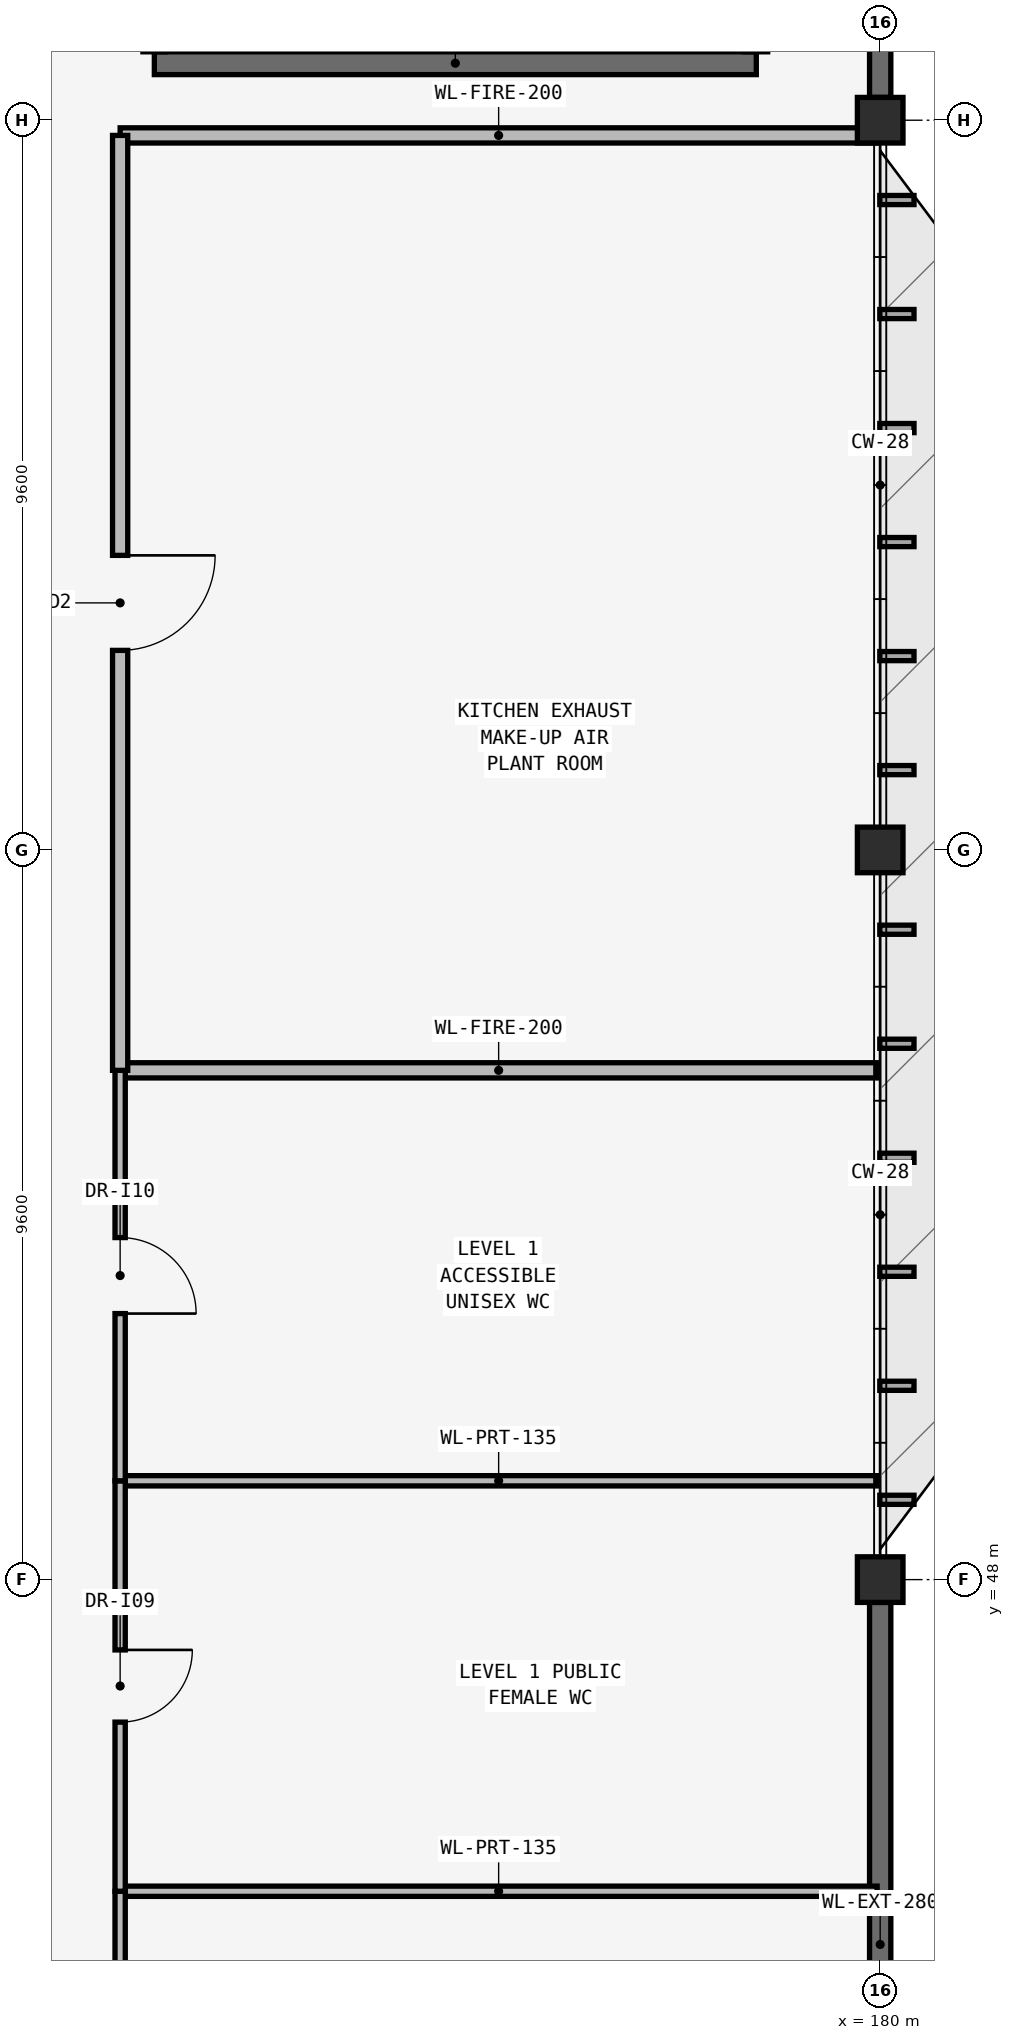
"""IFC4 building model, lengths in metres.
Left out: names, types, materials, properties, quantities, classifications, styles, units other than length and angle.
Written with IfcOpenShell. Run it as: python <this file> out.ifc"""

import sys

from ifc_helpers import new_model, si_unit, direction, frame, frame_2d, origin, origin_2d, place, context, subcontext, project, spatial, rectangle, extrude, element, fill, save


model = new_model("IFC4")
c1 = context("Model", 3, precision=1e-05, world=origin(), true_north=direction((0.0, 1.0)))
c2 = subcontext(c1, "Body", "Model", "MODEL_VIEW")
j1 = project(units=[si_unit("LENGTHUNIT", "METRE"), si_unit("PLANEANGLEUNIT", "RADIAN")], contexts=[c1])
p1 = place(None, origin())
s1 = spatial("IfcSite", under=j1, at=p1, CompositionType="ELEMENT")
p2 = place(p1, origin())
s2 = spatial("IfcBuilding", under=s1, at=p2, CompositionType="ELEMENT")
p3 = place(p2, frame((0.0, 0.0, 5.4)))
s3 = spatial("IfcBuildingStorey", under=s2, at=p3, CompositionType="ELEMENT", Elevation=5.4)
for number, where, z_axis, x_axis in (
    (1, (180.0, 48.0, 0.0), (0.0, 0.0, 1.0), (1.0, 0.0, 0.0)),
    (2, (180.0, 57.6, 0.0), (0.0, 0.0, 1.0), (1.0, 0.0, 0.0)),
    (3, (180.0, 67.2, 0.0), (0.0, 0.0, 1.0), (1.0, 0.0, 0.0)),
):
    element("IfcColumn", number, at=place(p3, frame(where, z_axis=z_axis, x_axis=x_axis)), inside=s3, PredefinedType="COLUMN", context=c2, shape_type="SweptSolid", body=[
        extrude(rectangle(XDim=0.6, YDim=0.6, at=origin_2d()), origin(), (0.0, 0.0, 1.0), 4.8),
    ])
for number, where, z_axis, x_axis in (
    (4, (180.0, 38.7, 0.0), (0.0, 0.0, 1.0), (0.0, 1.0, 0.0)),
    (5, (180.0, 67.5, 0.0), (0.0, 0.0, 1.0), (0.0, 1.0, 0.0)),
):
    element("IfcWall", number, at=place(p3, frame(where, z_axis=z_axis, x_axis=x_axis)), inside=s3, PredefinedType="SOLIDWALL", context=c2, shape_type="SweptSolid", body=[
        extrude(rectangle(XDim=9.0, YDim=0.28, at=frame_2d((4.5, 0.0))), origin(), (0.0, 0.0, 1.0), 4.5),
    ])
p4 = place(p3, frame((170.45, 67.95, 0.0), z_axis=(0.0, 0.0, 1.0), x_axis=(1.0, 0.0, 0.0)))
e6 = element("IfcWall", 6, at=p4, inside=s3, PredefinedType="SHEAR", context=c2, shape_type="SweptSolid", body=[
    extrude(rectangle(XDim=7.92, YDim=0.3, at=frame_2d((3.96, 0.0))), origin(), (0.0, 0.0, 1.0), 4.52),
])
for number, where, z_axis, x_axis in (
    (7, (170.0, 43.9, 0.0), (0.0, 0.0, 1.0), (1.0, 0.0, 0.0)),
    (8, (170.0, 49.3, 0.0), (0.0, 0.0, 1.0), (1.0, 0.0, 0.0)),
):
    element("IfcWall", number, at=place(p3, frame(where, z_axis=z_axis, x_axis=x_axis)), inside=s3, PredefinedType="PARTITIONING", context=c2, shape_type="SweptSolid", body=[
        extrude(rectangle(XDim=9.96, YDim=0.135, at=frame_2d((4.98, 0.0))), origin(), (0.0, 0.0, 1.0), 4.52),
    ])
p5 = place(p3, frame((170.0, 54.7, 0.0), z_axis=(0.0, 0.0, 1.0), x_axis=(1.0, 0.0, 0.0)))
e9 = element("IfcWall", 9, at=p5, inside=s3, PredefinedType="SOLIDWALL", context=c2, shape_type="SweptSolid", body=[
    extrude(rectangle(XDim=9.96, YDim=0.2, at=frame_2d((4.98, 0.0))), origin(), (0.0, 0.0, 1.0), 4.52),
])
p6 = place(p3, frame((170.0, 67.0, 0.0), z_axis=(0.0, 0.0, 1.0), x_axis=(1.0, 0.0, 0.0)))
e10 = element("IfcWall", 10, at=p6, inside=s3, PredefinedType="SOLIDWALL", context=c2, shape_type="SweptSolid", body=[
    extrude(rectangle(XDim=9.96, YDim=0.2, at=frame_2d((4.98, 0.0))), origin(), (0.0, 0.0, 1.0), 4.078),
])
p7 = place(p3, frame((170.0, 38.65, 0.0), z_axis=(0.0, 0.0, 1.0), x_axis=(0.0, 1.0, 0.0)))
e11 = element("IfcWall", 11, at=p7, inside=s3, PredefinedType="PARTITIONING", context=c2, shape_type="SweptSolid", body=[
    extrude(rectangle(XDim=5.25, YDim=0.135, at=frame_2d((2.625, 0.0))), origin(), (0.0, 0.0, 1.0), 4.52),
])
p8 = place(p7, frame((2.15, 0.0, 0.0)))
e12 = element("IfcOpeningElement", 12, at=p8, cuts=e11, PredefinedType="OPENING", context=c2, shape_type="SweptSolid", body=[
    extrude(rectangle(XDim=0.95, YDim=2.1, at=frame_2d((0.475, 1.05))), frame((0.0, 0.083, 0.0), z_axis=(0.0, -1.0, 0.0), x_axis=(1.0, 0.0, 0.0)), (0.0, 0.0, 1.0), 0.165),
])
p9 = place(p3, frame((170.0, 43.9, 0.0), z_axis=(0.0, 0.0, 1.0), x_axis=(0.0, 1.0, 0.0)))
e13 = element("IfcWall", 13, at=p9, inside=s3, PredefinedType="PARTITIONING", context=c2, shape_type="SweptSolid", body=[
    extrude(rectangle(XDim=5.4, YDim=0.135, at=frame_2d((2.7, 0.0))), origin(), (0.0, 0.0, 1.0), 4.52),
])
p10 = place(p9, frame((2.225, 0.0, 0.0)))
e14 = element("IfcOpeningElement", 14, at=p10, cuts=e13, PredefinedType="OPENING", context=c2, shape_type="SweptSolid", body=[
    extrude(rectangle(XDim=0.95, YDim=2.1, at=frame_2d((0.475, 1.05))), frame((0.0, 0.083, 0.0), z_axis=(0.0, -1.0, 0.0), x_axis=(1.0, 0.0, 0.0)), (0.0, 0.0, 1.0), 0.165),
])
p11 = place(p3, frame((170.0, 49.3, 0.0), z_axis=(0.0, 0.0, 1.0), x_axis=(0.0, 1.0, 0.0)))
e15 = element("IfcWall", 15, at=p11, inside=s3, PredefinedType="PARTITIONING", context=c2, shape_type="SweptSolid", body=[
    extrude(rectangle(XDim=5.4, YDim=0.135, at=frame_2d((2.7, 0.0))), origin(), (0.0, 0.0, 1.0), 4.52),
])
p12 = place(p11, frame((2.2, 0.0, 0.0)))
e16 = element("IfcOpeningElement", 16, at=p12, cuts=e15, PredefinedType="OPENING", context=c2, shape_type="SweptSolid", body=[
    extrude(rectangle(XDim=1.0, YDim=2.1, at=frame_2d((0.5, 1.05))), frame((0.0, 0.083, 0.0), z_axis=(0.0, -1.0, 0.0), x_axis=(1.0, 0.0, 0.0)), (0.0, 0.0, 1.0), 0.165),
])
p13 = place(p3, frame((170.0, 54.7, 0.0), z_axis=(0.0, 0.0, 1.0), x_axis=(0.0, 1.0, 0.0)))
e17 = element("IfcWall", 17, at=p13, inside=s3, PredefinedType="SOLIDWALL", context=c2, shape_type="SweptSolid", body=[
    extrude(rectangle(XDim=12.3, YDim=0.2, at=frame_2d((6.15, 0.0))), origin(), (0.0, 0.0, 1.0), 4.52),
])
p14 = place(p13, frame((5.525, 0.0, 0.0)))
e18 = element("IfcOpeningElement", 18, at=p14, cuts=e17, PredefinedType="OPENING", context=c2, shape_type="SweptSolid", body=[
    extrude(rectangle(XDim=1.25, YDim=2.2, at=frame_2d((0.625, 1.1))), frame((0.0, 0.115, 0.0), z_axis=(0.0, -1.0, 0.0), x_axis=(1.0, 0.0, 0.0)), (0.0, 0.0, 1.0), 0.23),
])
p15 = place(p10, origin())
e19 = element("IfcDoor", 19, at=p15, inside=s3, OperationType="SINGLE_SWING_RIGHT", PredefinedType="DOOR", context=c2, shape_type="SweptSolid", body=[
    extrude(rectangle(XDim=0.95, YDim=2.1, at=frame_2d((0.475, 1.05))), frame((0.0, 0.025, 0.0), z_axis=(0.0, -1.0, 0.0), x_axis=(1.0, 0.0, 0.0)), (0.0, 0.0, 1.0), 0.05),
])
fill(e14, e19)
p16 = place(p12, origin())
e20 = element("IfcDoor", 20, at=p16, inside=s3, OperationType="SINGLE_SWING_LEFT", PredefinedType="DOOR", context=c2, shape_type="SweptSolid", body=[
    extrude(rectangle(XDim=1.0, YDim=2.1, at=frame_2d((0.5, 1.05))), frame((0.0, 0.025, 0.0), z_axis=(0.0, -1.0, 0.0), x_axis=(1.0, 0.0, 0.0)), (0.0, 0.0, 1.0), 0.05),
])
fill(e16, e20)
p17 = place(p14, origin())
e21 = element("IfcDoor", 21, at=p17, inside=s3, OperationType="SINGLE_SWING_RIGHT", PredefinedType="DOOR", context=c2, shape_type="SweptSolid", body=[
    extrude(rectangle(XDim=1.25, YDim=2.2, at=frame_2d((0.625, 1.1))), frame((0.0, 0.025, 0.0), z_axis=(0.0, -1.0, 0.0), x_axis=(1.0, 0.0, 0.0)), (0.0, 0.0, 1.0), 0.05),
])
fill(e18, e21)
save(model, sys.argv[1])
